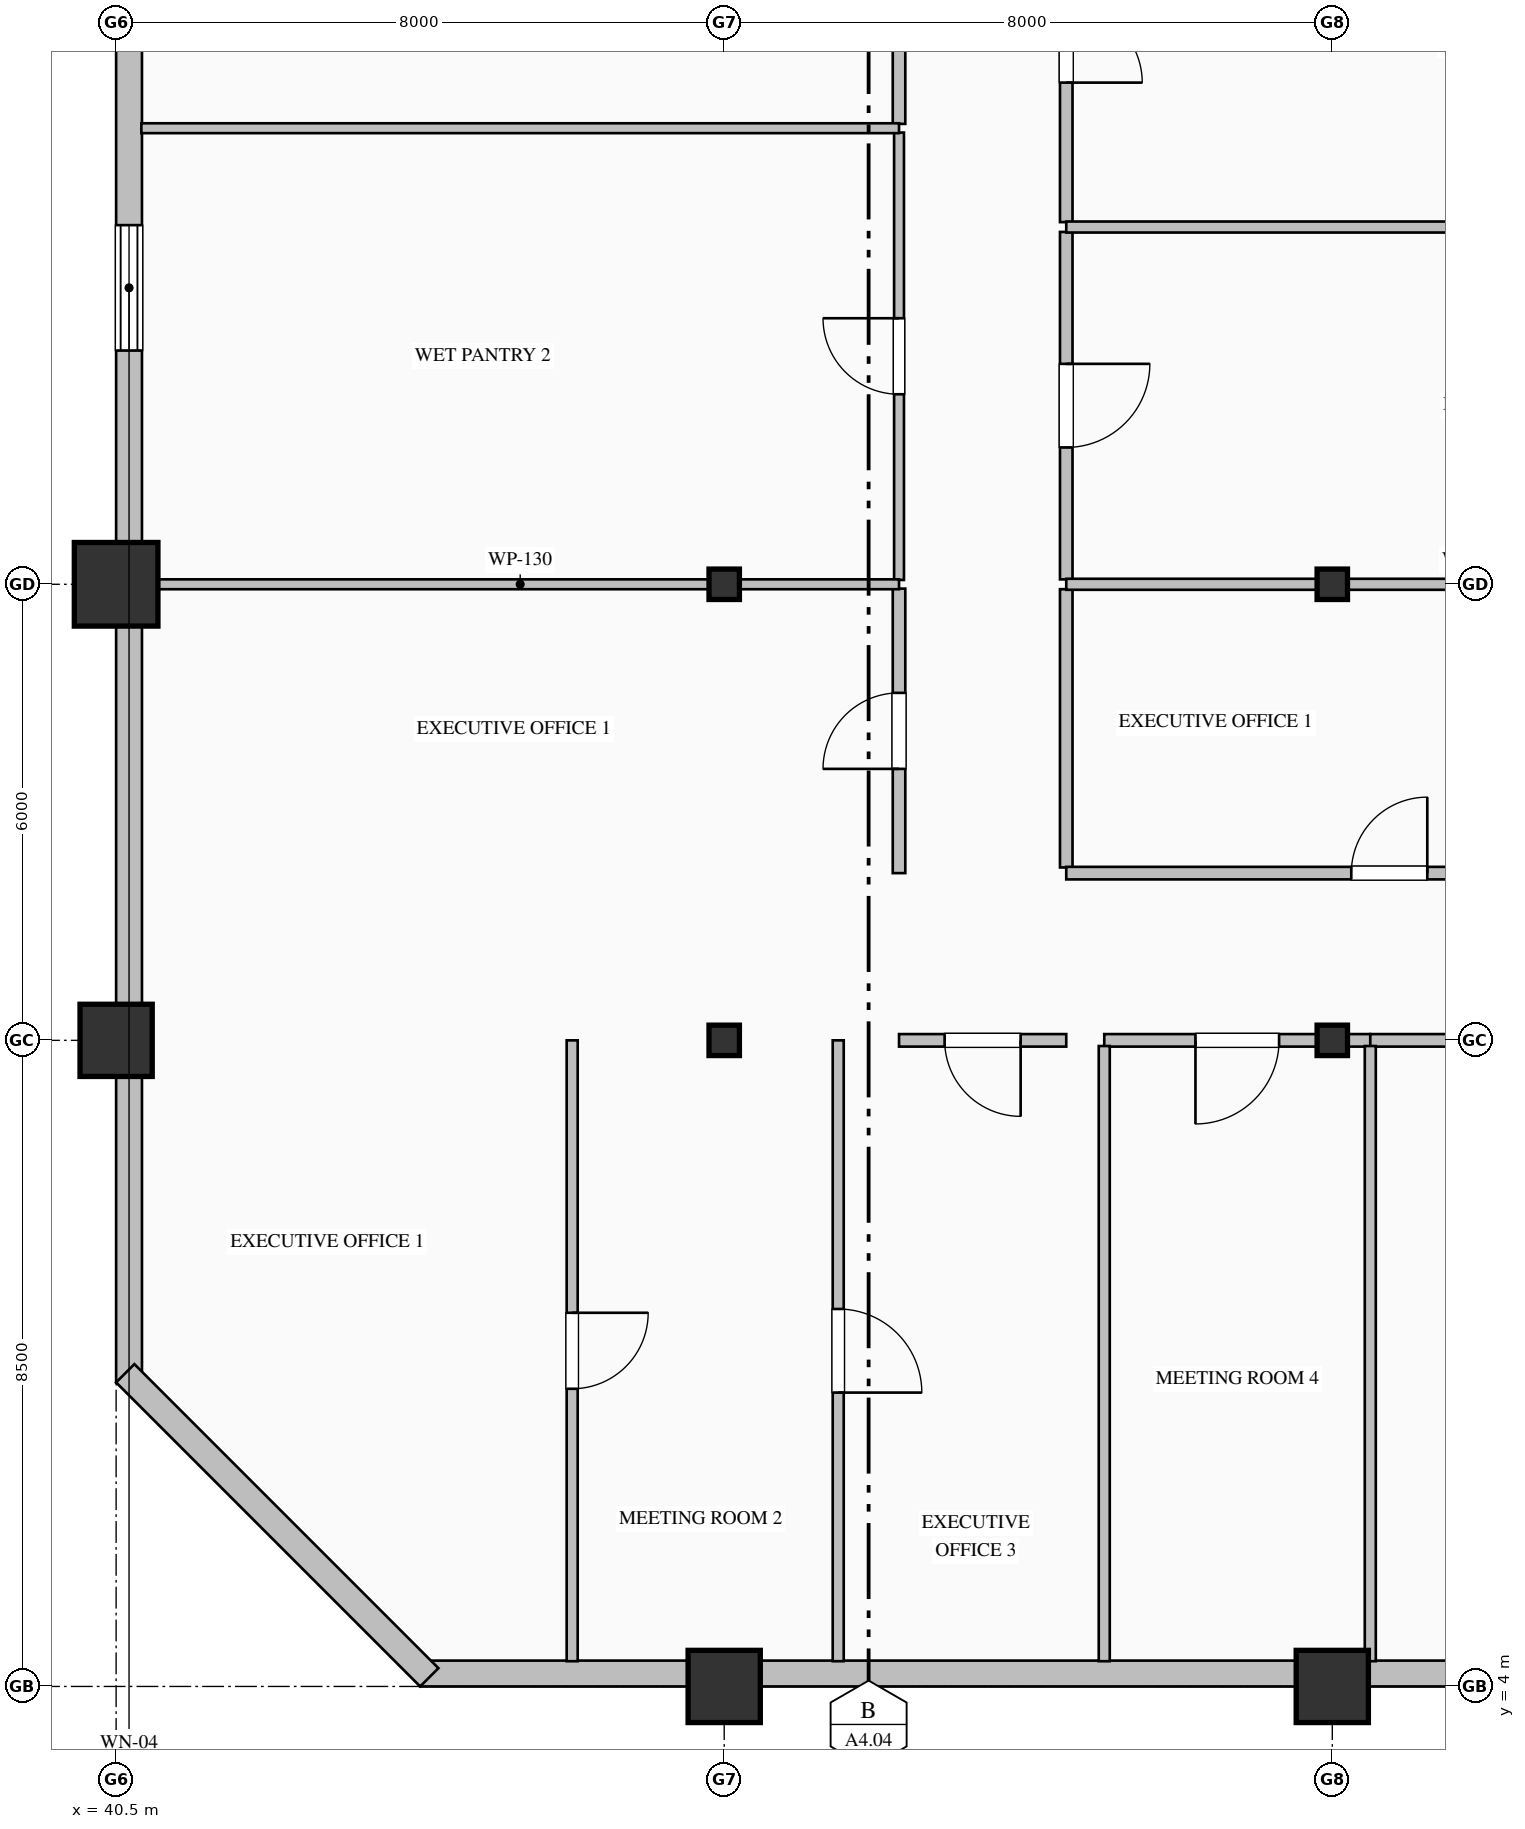
"""IFC4 building model, lengths in metres.
Left out: names, types, materials, properties, quantities, classifications, styles, units other than length and angle.
Written with IfcOpenShell. Run it as: python <this file> out.ifc"""

import sys

from ifc_helpers import new_model, si_unit, direction, frame, frame_2d, origin, origin_2d, place, context, subcontext, project, spatial, rectangle, hollow_rectangle, i_section, extrude, element, fill, save


model = new_model("IFC4")
c1 = context("Model", 3, precision=1e-05, world=origin(), true_north=direction((0.0, 1.0)))
c2 = subcontext(c1, "Body", "Model", "MODEL_VIEW")
j1 = project(units=[si_unit("LENGTHUNIT", "METRE"), si_unit("PLANEANGLEUNIT", "RADIAN")], contexts=[c1])
p1 = place(None, origin())
s1 = spatial("IfcSite", under=j1, at=p1, CompositionType="ELEMENT")
p2 = place(p1, origin())
s2 = spatial("IfcBuilding", under=s1, at=p2, CompositionType="ELEMENT")
p3 = place(p2, frame((0.0, 0.0, 119.0)))
s3 = spatial("IfcBuildingStorey", under=s2, at=p3, CompositionType="ELEMENT", Elevation=119.0)
p4 = place(p3, frame((40.5, 12.5, 0.0), z_axis=(0.0, 0.0, 1.0), x_axis=(1.0, 0.0, 0.0)))
e1 = element("IfcColumn", 1, at=p4, inside=s3, PredefinedType="COLUMN", context=c2, shape_type="SweptSolid", body=[
    extrude(hollow_rectangle(XDim=0.95, YDim=0.95, WallThickness=0.036, at=origin_2d()), origin(), (0.0, 0.0, 1.0), 4.0),
])
p5 = place(p3, frame((40.5, 18.5, 0.0), z_axis=(0.0, 0.0, 1.0), x_axis=(1.0, 0.0, 0.0)))
e2 = element("IfcColumn", 2, at=p5, inside=s3, PredefinedType="COLUMN", context=c2, shape_type="SweptSolid", body=[
    extrude(hollow_rectangle(XDim=1.1, YDim=1.1, WallThickness=0.04, at=origin_2d()), origin(), (0.0, 0.0, 1.0), 4.0),
])
p6 = place(p3, frame((48.5, 4.0, 0.0), z_axis=(0.0, 0.0, 1.0), x_axis=(1.0, 0.0, 0.0)))
e3 = element("IfcColumn", 3, at=p6, inside=s3, PredefinedType="COLUMN", context=c2, shape_type="SweptSolid", body=[
    extrude(hollow_rectangle(XDim=0.95, YDim=0.95, WallThickness=0.036, at=origin_2d()), origin(), (0.0, 0.0, 1.0), 4.0),
])
for number, where, z_axis, x_axis in (
    (4, (48.5, 12.5, 0.0), (0.0, 0.0, 1.0), (1.0, 0.0, 0.0)),
    (5, (48.5, 18.5, 0.0), (0.0, 0.0, 1.0), (1.0, 0.0, 0.0)),
):
    element("IfcColumn", number, at=place(p3, frame(where, z_axis=z_axis, x_axis=x_axis)), inside=s3, PredefinedType="COLUMN", context=c2, shape_type="SweptSolid", body=[
        extrude(i_section(OverallWidth=0.4, OverallDepth=0.4, WebThickness=0.013, FlangeThickness=0.021, FilletRadius=0.022, at=origin_2d()), origin(), (0.0, 0.0, 1.0), 4.0),
    ])
p7 = place(p3, frame((56.5, 4.0, 0.0), z_axis=(0.0, 0.0, 1.0), x_axis=(1.0, 0.0, 0.0)))
e6 = element("IfcColumn", 6, at=p7, inside=s3, PredefinedType="COLUMN", context=c2, shape_type="SweptSolid", body=[
    extrude(hollow_rectangle(XDim=0.95, YDim=0.95, WallThickness=0.036, at=origin_2d()), origin(), (0.0, 0.0, 1.0), 4.0),
])
for number, where, z_axis, x_axis in (
    (7, (56.5, 12.5, 0.0), (0.0, 0.0, 1.0), (1.0, 0.0, 0.0)),
    (8, (56.5, 18.5, 0.0), (0.0, 0.0, 1.0), (1.0, 0.0, 0.0)),
):
    element("IfcColumn", number, at=place(p3, frame(where, z_axis=z_axis, x_axis=x_axis)), inside=s3, PredefinedType="COLUMN", context=c2, shape_type="SweptSolid", body=[
        extrude(i_section(OverallWidth=0.4, OverallDepth=0.4, WebThickness=0.013, FlangeThickness=0.021, FilletRadius=0.022, at=origin_2d()), origin(), (0.0, 0.0, 1.0), 4.0),
    ])
p8 = place(p3, frame((40.67, 8.0, 0.0), z_axis=(0.0, 0.0, 1.0), x_axis=(0.0, 1.0, 0.0)))
e9 = element("IfcWall", 9, at=p8, inside=s3, PredefinedType="SOLIDWALL", context=c2, shape_type="SweptSolid", body=[
    extrude(rectangle(XDim=20.34, YDim=0.34, at=frame_2d((10.17, 0.0))), origin(), (0.0, 0.0, 1.0), 3.165),
])
p9 = place(p8, frame((13.575, 0.0, 0.85)))
e10 = element("IfcOpeningElement", 10, at=p9, cuts=e9, PredefinedType="OPENING", context=c2, shape_type="SweptSolid", body=[
    extrude(rectangle(XDim=1.65, YDim=1.95, at=frame_2d((0.825, 0.975))), frame((0.0, 0.18, 0.0), z_axis=(0.0, -1.0, 0.0), x_axis=(1.0, 0.0, 0.0)), (0.0, 0.0, 1.0), 0.36),
])
p10 = place(p3, frame((60.0, 4.17, 0.0), z_axis=(0.0, 0.0, 1.0), x_axis=(-1.0, 0.0, 0.0)))
e11 = element("IfcWall", 11, at=p10, inside=s3, PredefinedType="SOLIDWALL", context=c2, shape_type="SweptSolid", body=[
    extrude(rectangle(XDim=15.5, YDim=0.34, at=frame_2d((7.75, 0.0))), origin(), (0.0, 0.0, 1.0), 3.265),
])
p11 = place(p3, frame((44.62, 4.12, 0.0), z_axis=(0.0, 0.0, 1.0), x_axis=(-0.707106781187, 0.707106781187, 0.0)))
e12 = element("IfcWall", 12, at=p11, inside=s3, PredefinedType="SOLIDWALL", context=c2, shape_type="SweptSolid", body=[
    extrude(rectangle(XDim=5.657, YDim=0.34, at=frame_2d((2.828, 0.0))), origin(), (0.0, 0.0, 1.0), 3.765),
])
p12 = place(p3, frame((53.0, 18.436, 0.0), z_axis=(0.0, 0.0, 1.0), x_axis=(0.0, -1.0, 0.0)))
e13 = element("IfcWall", 13, at=p12, inside=s3, PredefinedType="PARTITIONING", context=c2, shape_type="SweptSolid", body=[
    extrude(rectangle(XDim=3.661, YDim=0.165, at=frame_2d((1.831, 0.0))), origin(), (0.0, 0.0, 1.0), 3.765),
])
p13 = place(p3, frame((53.0, 23.135, 0.0), z_axis=(0.0, 0.0, 1.0), x_axis=(0.0, -1.0, 0.0)))
e14 = element("IfcWall", 14, at=p13, inside=s3, PredefinedType="PARTITIONING", context=c2, shape_type="SweptSolid", body=[
    extrude(rectangle(XDim=4.571, YDim=0.165, at=frame_2d((2.286, 0.0))), origin(), (0.0, 0.0, 1.0), 3.765),
])
p14 = place(p13, frame((1.736, 0.0, 0.0)))
e15 = element("IfcOpeningElement", 15, at=p14, cuts=e14, PredefinedType="OPENING", context=c2, shape_type="SweptSolid", body=[
    extrude(rectangle(XDim=1.1, YDim=2.2, at=frame_2d((0.55, 1.1))), frame((0.0, 0.093, 0.0), z_axis=(0.0, -1.0, 0.0), x_axis=(1.0, 0.0, 0.0)), (0.0, 0.0, 1.0), 0.185),
])
p15 = place(p3, frame((53.0, 27.936, 0.0), z_axis=(0.0, 0.0, 1.0), x_axis=(0.0, -1.0, 0.0)))
e16 = element("IfcWall", 16, at=p15, inside=s3, PredefinedType="PARTITIONING", context=c2, shape_type="SweptSolid", body=[
    extrude(rectangle(XDim=4.671, YDim=0.165, at=frame_2d((2.335, 0.0))), origin(), (0.0, 0.0, 1.0), 3.765),
])
p16 = place(p15, frame((1.835, 0.0, 0.0)))
e17 = element("IfcOpeningElement", 17, at=p16, cuts=e16, PredefinedType="OPENING", context=c2, shape_type="SweptSolid", body=[
    extrude(rectangle(XDim=1.0, YDim=2.15, at=frame_2d((0.5, 1.075))), frame((0.0, 0.093, 0.0), z_axis=(0.0, -1.0, 0.0), x_axis=(1.0, 0.0, 0.0)), (0.0, 0.0, 1.0), 0.185),
])
p17 = place(p3, frame((50.8, 14.7, 0.0), z_axis=(0.0, 0.0, 1.0), x_axis=(0.0, 1.0, 0.0)))
e18 = element("IfcWall", 18, at=p17, inside=s3, PredefinedType="PARTITIONING", context=c2, shape_type="SweptSolid", body=[
    extrude(rectangle(XDim=3.743, YDim=0.165, at=frame_2d((1.872, 0.0))), origin(), (0.0, 0.0, 1.0), 3.765),
])
p18 = place(p17, frame((1.372, 0.0, 0.0)))
e19 = element("IfcOpeningElement", 19, at=p18, cuts=e18, PredefinedType="OPENING", context=c2, shape_type="SweptSolid", body=[
    extrude(rectangle(XDim=1.0, YDim=2.15, at=frame_2d((0.5, 1.075))), frame((0.0, 0.093, 0.0), z_axis=(0.0, -1.0, 0.0), x_axis=(1.0, 0.0, 0.0)), (0.0, 0.0, 1.0), 0.185),
])
p19 = place(p3, frame((50.8, 18.557, 0.0), z_axis=(0.0, 0.0, 1.0), x_axis=(0.0, 1.0, 0.0)))
e20 = element("IfcWall", 20, at=p19, inside=s3, PredefinedType="PARTITIONING", context=c2, shape_type="SweptSolid", body=[
    extrude(rectangle(XDim=5.886, YDim=0.13, at=frame_2d((2.943, 0.0))), origin(), (0.0, 0.0, 1.0), 3.765),
])
p20 = place(p19, frame((2.443, 0.0, 0.0)))
e21 = element("IfcOpeningElement", 21, at=p20, cuts=e20, PredefinedType="OPENING", context=c2, shape_type="SweptSolid", body=[
    extrude(rectangle(XDim=1.0, YDim=2.15, at=frame_2d((0.5, 1.075))), frame((0.0, 0.075, 0.0), z_axis=(0.0, -1.0, 0.0), x_axis=(1.0, 0.0, 0.0)), (0.0, 0.0, 1.0), 0.15),
])
p21 = place(p3, frame((50.8, 24.557, 0.0), z_axis=(0.0, 0.0, 1.0), x_axis=(0.0, 1.0, 0.0)))
e22 = element("IfcWall", 22, at=p21, inside=s3, PredefinedType="PARTITIONING", context=c2, shape_type="SweptSolid", body=[
    extrude(rectangle(XDim=3.379, YDim=0.165, at=frame_2d((1.689, 0.0))), origin(), (0.0, 0.0, 1.0), 3.765),
])
p22 = place(p21, frame((1.189, 0.0, 0.0)))
e23 = element("IfcOpeningElement", 23, at=p22, cuts=e22, PredefinedType="OPENING", context=c2, shape_type="SweptSolid", body=[
    extrude(rectangle(XDim=1.0, YDim=2.15, at=frame_2d((0.5, 1.075))), frame((0.0, 0.093, 0.0), z_axis=(0.0, -1.0, 0.0), x_axis=(1.0, 0.0, 0.0)), (0.0, 0.0, 1.0), 0.185),
])
p23 = place(p3, frame((53.0, 12.5, 0.0), z_axis=(0.0, 0.0, 1.0), x_axis=(-1.0, 0.0, 0.0)))
e24 = element("IfcWall", 24, at=p23, inside=s3, PredefinedType="PARTITIONING", context=c2, shape_type="SweptSolid", body=[
    extrude(rectangle(XDim=2.2, YDim=0.165, at=frame_2d((1.1, 0.0))), origin(), (0.0, 0.0, 1.0), 3.157),
])
p24 = place(p23, frame((0.6, 0.0, 0.0)))
e25 = element("IfcOpeningElement", 25, at=p24, cuts=e24, PredefinedType="OPENING", context=c2, shape_type="SweptSolid", body=[
    extrude(rectangle(XDim=1.0, YDim=2.15, at=frame_2d((0.5, 1.075))), frame((0.0, 0.093, 0.0), z_axis=(0.0, -1.0, 0.0), x_axis=(1.0, 0.0, 0.0)), (0.0, 0.0, 1.0), 0.185),
])
p25 = place(p3, frame((53.0, 14.7, 0.0), z_axis=(0.0, 0.0, 1.0), x_axis=(1.0, 0.0, 0.0)))
e26 = element("IfcWall", 26, at=p25, inside=s3, PredefinedType="PARTITIONING", context=c2, shape_type="SweptSolid", body=[
    extrude(rectangle(XDim=8.5, YDim=0.165, at=frame_2d((4.25, 0.0))), origin(), (0.0, 0.0, 1.0), 3.765),
])
p26 = place(p25, frame((3.75, 0.0, 0.0)))
e27 = element("IfcOpeningElement", 27, at=p26, cuts=e26, PredefinedType="OPENING", context=c2, shape_type="SweptSolid", body=[
    extrude(rectangle(XDim=1.0, YDim=2.15, at=frame_2d((0.5, 1.075))), frame((0.0, 0.093, 0.0), z_axis=(0.0, -1.0, 0.0), x_axis=(1.0, 0.0, 0.0)), (0.0, 0.0, 1.0), 0.185),
])
p27 = place(p3, frame((57.0, 12.5, 0.0), z_axis=(0.0, 0.0, 1.0), x_axis=(-1.0, 0.0, 0.0)))
e28 = element("IfcWall", 28, at=p27, inside=s3, PredefinedType="PARTITIONING", context=c2, shape_type="SweptSolid", body=[
    extrude(rectangle(XDim=3.5, YDim=0.165, at=frame_2d((1.75, 0.0))), origin(), (0.0, 0.0, 1.0), 3.157),
])
p28 = place(p27, frame((1.2, 0.0, 0.0)))
e29 = element("IfcOpeningElement", 29, at=p28, cuts=e28, PredefinedType="OPENING", context=c2, shape_type="SweptSolid", body=[
    extrude(rectangle(XDim=1.1, YDim=2.2, at=frame_2d((0.55, 1.1))), frame((0.0, 0.093, 0.0), z_axis=(0.0, -1.0, 0.0), x_axis=(1.0, 0.0, 0.0)), (0.0, 0.0, 1.0), 0.185),
])
p29 = place(p3, frame((61.5, 12.5, 0.0), z_axis=(0.0, 0.0, 1.0), x_axis=(-1.0, 0.0, 0.0)))
e30 = element("IfcWall", 30, at=p29, inside=s3, PredefinedType="PARTITIONING", context=c2, shape_type="SweptSolid", body=[
    extrude(rectangle(XDim=4.5, YDim=0.165, at=frame_2d((2.25, 0.0))), origin(), (0.0, 0.0, 1.0), 3.157),
])
p30 = place(p29, frame((1.75, 0.0, 0.0)))
e31 = element("IfcOpeningElement", 31, at=p30, cuts=e30, PredefinedType="OPENING", context=c2, shape_type="SweptSolid", body=[
    extrude(rectangle(XDim=1.0, YDim=2.15, at=frame_2d((0.5, 1.075))), frame((0.0, 0.093, 0.0), z_axis=(0.0, -1.0, 0.0), x_axis=(1.0, 0.0, 0.0)), (0.0, 0.0, 1.0), 0.185),
])
p31 = place(p3, frame((53.0, 18.5, 0.0), z_axis=(0.0, 0.0, 1.0), x_axis=(1.0, 0.0, 0.0)))
e32 = element("IfcWall", 32, at=p31, inside=s3, PredefinedType="PARTITIONING", context=c2, shape_type="SweptSolid", body=[
    extrude(rectangle(XDim=10.728, YDim=0.145, at=frame_2d((5.364, 0.0))), origin(), (0.0, 0.0, 1.0), 3.157),
])
p32 = place(p3, frame((53.0, 23.2, 0.0), z_axis=(0.0, 0.0, 1.0), x_axis=(1.0, 0.0, 0.0)))
e33 = element("IfcWall", 33, at=p32, inside=s3, PredefinedType="PARTITIONING", context=c2, shape_type="SweptSolid", body=[
    extrude(rectangle(XDim=10.728, YDim=0.145, at=frame_2d((5.364, 0.0))), origin(), (0.0, 0.0, 1.0), 3.407),
])
p33 = place(p3, frame((40.832, 18.5, 0.0), z_axis=(0.0, 0.0, 1.0), x_axis=(1.0, 0.0, 0.0)))
e34 = element("IfcWall", 34, at=p33, inside=s3, PredefinedType="PARTITIONING", context=c2, shape_type="SweptSolid", body=[
    extrude(rectangle(XDim=9.968, YDim=0.13, at=frame_2d((4.984, 0.0))), origin(), (0.0, 0.0, 1.0), 3.157),
])
p34 = place(p3, frame((40.832, 24.5, 0.0), z_axis=(0.0, 0.0, 1.0), x_axis=(1.0, 0.0, 0.0)))
e35 = element("IfcWall", 35, at=p34, inside=s3, PredefinedType="PARTITIONING", context=c2, shape_type="SweptSolid", body=[
    extrude(rectangle(XDim=9.968, YDim=0.13, at=frame_2d((4.984, 0.0))), origin(), (0.0, 0.0, 1.0), 3.765),
])
p35 = place(p3, frame((46.5, 12.5, 0.0), z_axis=(0.0, 0.0, 1.0), x_axis=(0.0, -1.0, 0.0)))
e36 = element("IfcWall", 36, at=p35, inside=s3, PredefinedType="PARTITIONING", context=c2, shape_type="SweptSolid", body=[
    extrude(rectangle(XDim=8.168, YDim=0.145, at=frame_2d((4.084, 0.0))), origin(), (0.0, 0.0, 1.0), 3.765),
])
p36 = place(p35, frame((3.584, 0.0, 0.0)))
e37 = element("IfcOpeningElement", 37, at=p36, cuts=e36, PredefinedType="OPENING", context=c2, shape_type="SweptSolid", body=[
    extrude(rectangle(XDim=1.0, YDim=2.15, at=frame_2d((0.5, 1.075))), frame((0.0, 0.083, 0.0), z_axis=(0.0, -1.0, 0.0), x_axis=(1.0, 0.0, 0.0)), (0.0, 0.0, 1.0), 0.165),
])
p37 = place(p3, frame((50.0, 12.5, 0.0), z_axis=(0.0, 0.0, 1.0), x_axis=(0.0, -1.0, 0.0)))
e38 = element("IfcWall", 38, at=p37, inside=s3, PredefinedType="PARTITIONING", context=c2, shape_type="SweptSolid", body=[
    extrude(rectangle(XDim=8.168, YDim=0.145, at=frame_2d((4.084, 0.0))), origin(), (0.0, 0.0, 1.0), 3.765),
])
p38 = place(p37, frame((3.534, 0.0, 0.0)))
e39 = element("IfcOpeningElement", 39, at=p38, cuts=e38, PredefinedType="OPENING", context=c2, shape_type="SweptSolid", body=[
    extrude(rectangle(XDim=1.1, YDim=2.2, at=frame_2d((0.55, 1.1))), frame((0.0, 0.083, 0.0), z_axis=(0.0, -1.0, 0.0), x_axis=(1.0, 0.0, 0.0)), (0.0, 0.0, 1.0), 0.165),
])
for number, where, z_axis, x_axis in (
    (40, (53.5, 12.426, 0.0), (0.0, 0.0, 1.0), (0.0, -1.0, 0.0)),
    (41, (57.0, 12.426, 0.0), (0.0, 0.0, 1.0), (0.0, -1.0, 0.0)),
):
    element("IfcWall", number, at=place(p3, frame(where, z_axis=z_axis, x_axis=x_axis)), inside=s3, PredefinedType="PARTITIONING", context=c2, shape_type="SweptSolid", body=[
        extrude(rectangle(XDim=8.094, YDim=0.145, at=frame_2d((4.047, 0.0))), origin(), (0.0, 0.0, 1.0), 3.765),
    ])
p39 = place(p9, origin())
e42 = element("IfcWindow", 42, at=p39, inside=s3, PartitioningType="DOUBLE_PANEL_VERTICAL", PredefinedType="WINDOW", context=c2, shape_type="SweptSolid", body=[
    extrude(rectangle(XDim=1.65, YDim=1.95, at=frame_2d((0.825, 0.975))), frame((0.0, 0.15, 0.0), z_axis=(0.0, -1.0, 0.0), x_axis=(1.0, 0.0, 0.0)), (0.0, 0.0, 1.0), 0.06),
])
fill(e10, e42)
p40 = place(p26, origin())
e43 = element("IfcDoor", 43, at=p40, inside=s3, OperationType="SINGLE_SWING_RIGHT", PredefinedType="DOOR", context=c2, shape_type="SweptSolid", body=[
    extrude(rectangle(XDim=1.0, YDim=2.15, at=frame_2d((0.5, 1.075))), frame((0.0, 0.025, 0.0), z_axis=(0.0, -1.0, 0.0), x_axis=(1.0, 0.0, 0.0)), (0.0, 0.0, 1.0), 0.05),
])
fill(e27, e43)
p41 = place(p14, origin())
e44 = element("IfcDoor", 44, at=p41, inside=s3, OperationType="SINGLE_SWING_LEFT", PredefinedType="DOOR", context=c2, shape_type="SweptSolid", body=[
    extrude(rectangle(XDim=1.1, YDim=2.2, at=frame_2d((0.55, 1.1))), frame((0.0, 0.025, 0.0), z_axis=(0.0, -1.0, 0.0), x_axis=(1.0, 0.0, 0.0)), (0.0, 0.0, 1.0), 0.05),
])
fill(e15, e44)
p42 = place(p16, origin())
e45 = element("IfcDoor", 45, at=p42, inside=s3, OperationType="SINGLE_SWING_RIGHT", PredefinedType="DOOR", context=c2, shape_type="SweptSolid", body=[
    extrude(rectangle(XDim=1.0, YDim=2.15, at=frame_2d((0.5, 1.075))), frame((0.0, 0.025, 0.0), z_axis=(0.0, -1.0, 0.0), x_axis=(1.0, 0.0, 0.0)), (0.0, 0.0, 1.0), 0.05),
])
fill(e17, e45)
p43 = place(p18, origin())
e46 = element("IfcDoor", 46, at=p43, inside=s3, OperationType="SINGLE_SWING_LEFT", PredefinedType="DOOR", context=c2, shape_type="SweptSolid", body=[
    extrude(rectangle(XDim=1.0, YDim=2.15, at=frame_2d((0.5, 1.075))), frame((0.0, 0.025, 0.0), z_axis=(0.0, -1.0, 0.0), x_axis=(1.0, 0.0, 0.0)), (0.0, 0.0, 1.0), 0.05),
])
fill(e19, e46)
p44 = place(p20, origin())
e47 = element("IfcDoor", 47, at=p44, inside=s3, OperationType="SINGLE_SWING_RIGHT", PredefinedType="DOOR", context=c2, shape_type="SweptSolid", body=[
    extrude(rectangle(XDim=1.0, YDim=2.15, at=frame_2d((0.5, 1.075))), frame((0.0, 0.025, 0.0), z_axis=(0.0, -1.0, 0.0), x_axis=(1.0, 0.0, 0.0)), (0.0, 0.0, 1.0), 0.05),
])
fill(e21, e47)
p45 = place(p36, origin())
e48 = element("IfcDoor", 48, at=p45, inside=s3, OperationType="SINGLE_SWING_LEFT", PredefinedType="DOOR", context=c2, shape_type="SweptSolid", body=[
    extrude(rectangle(XDim=1.0, YDim=2.15, at=frame_2d((0.5, 1.075))), frame((0.0, 0.025, 0.0), z_axis=(0.0, -1.0, 0.0), x_axis=(1.0, 0.0, 0.0)), (0.0, 0.0, 1.0), 0.05),
])
fill(e37, e48)
p46 = place(p38, origin())
e49 = element("IfcDoor", 49, at=p46, inside=s3, OperationType="SINGLE_SWING_RIGHT", PredefinedType="DOOR", context=c2, shape_type="SweptSolid", body=[
    extrude(rectangle(XDim=1.1, YDim=2.2, at=frame_2d((0.55, 1.1))), frame((0.0, 0.025, 0.0), z_axis=(0.0, -1.0, 0.0), x_axis=(1.0, 0.0, 0.0)), (0.0, 0.0, 1.0), 0.05),
])
fill(e39, e49)
p47 = place(p24, origin())
e50 = element("IfcDoor", 50, at=p47, inside=s3, OperationType="SINGLE_SWING_LEFT", PredefinedType="DOOR", context=c2, shape_type="SweptSolid", body=[
    extrude(rectangle(XDim=1.0, YDim=2.15, at=frame_2d((0.5, 1.075))), frame((0.0, 0.025, 0.0), z_axis=(0.0, -1.0, 0.0), x_axis=(1.0, 0.0, 0.0)), (0.0, 0.0, 1.0), 0.05),
])
fill(e25, e50)
p48 = place(p28, origin())
e51 = element("IfcDoor", 51, at=p48, inside=s3, OperationType="SINGLE_SWING_RIGHT", PredefinedType="DOOR", context=c2, shape_type="SweptSolid", body=[
    extrude(rectangle(XDim=1.1, YDim=2.2, at=frame_2d((0.55, 1.1))), frame((0.0, 0.025, 0.0), z_axis=(0.0, -1.0, 0.0), x_axis=(1.0, 0.0, 0.0)), (0.0, 0.0, 1.0), 0.05),
])
fill(e29, e51)
save(model, sys.argv[1])
